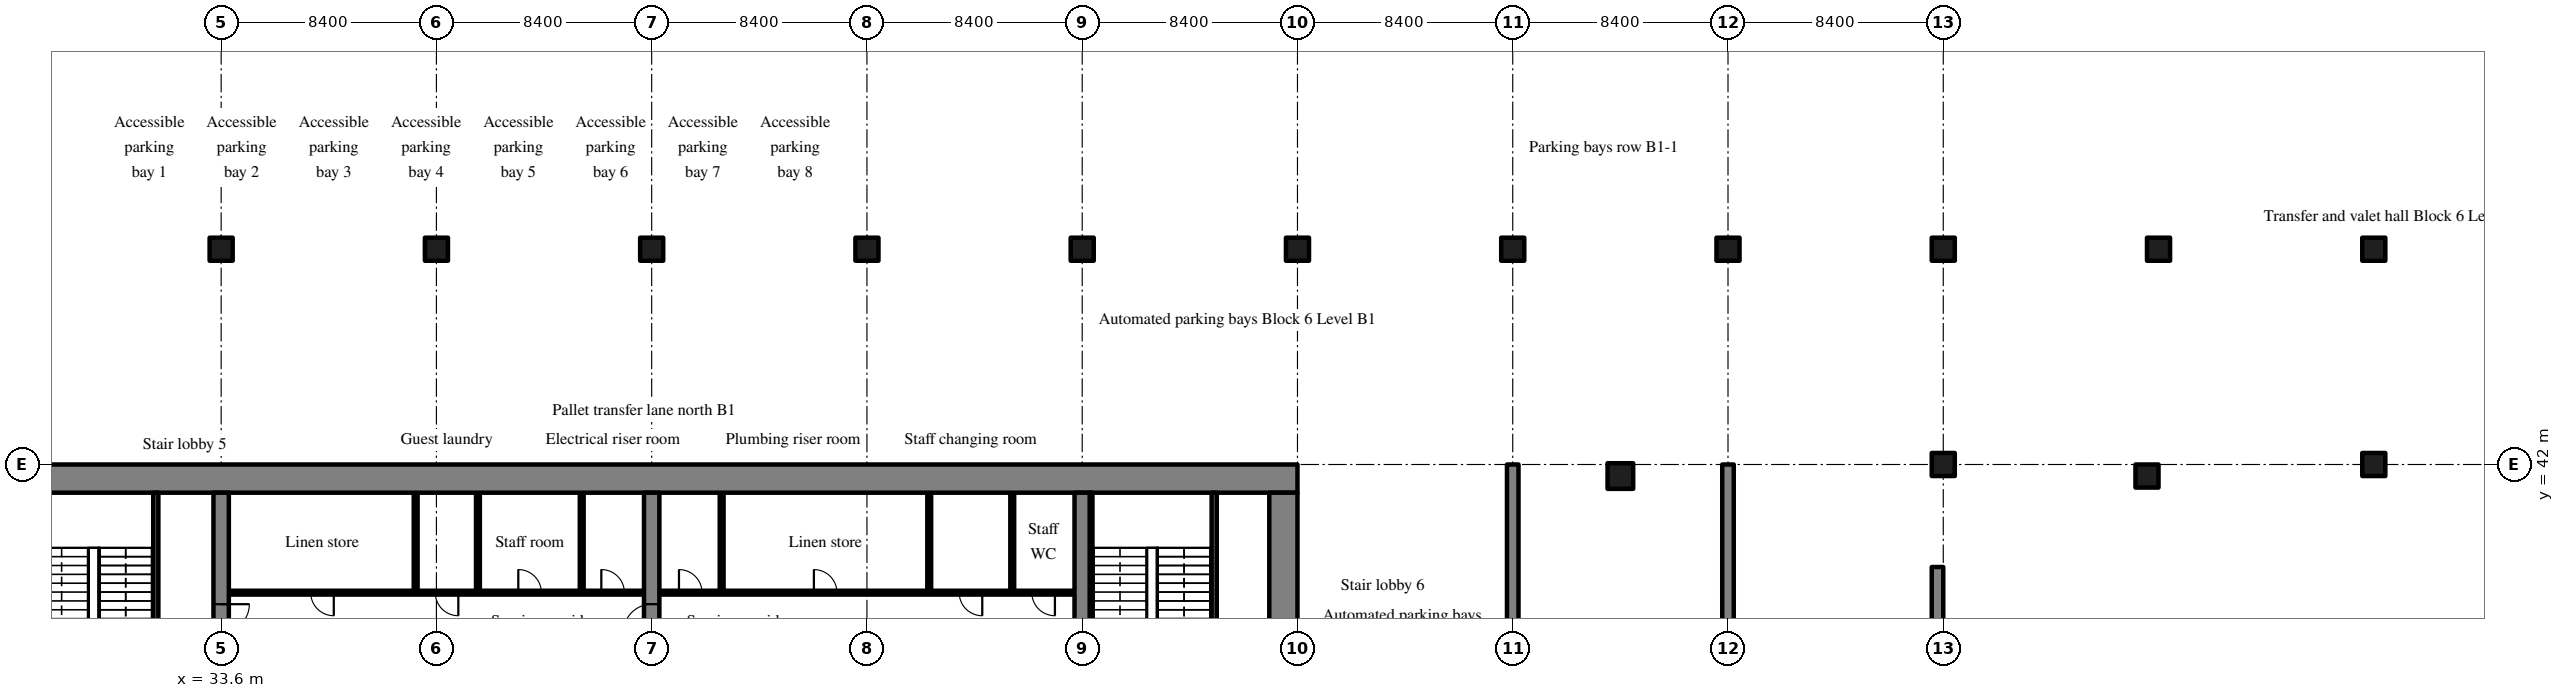
"""IFC4 building model, lengths in metres.
Left out: names, types, materials, properties, quantities, classifications, styles, units other than length and angle.
Written with IfcOpenShell. Run it as: python <this file> out.ifc"""

import sys

from ifc_helpers import new_model, si_unit, direction, frame, frame_2d, origin, origin_2d, place, context, subcontext, project, spatial, rectangle, extrude, source, transform, mapped, element, fill, save


model = new_model("IFC4")
c1 = context("Model", 3, precision=1e-05, world=origin(), true_north=direction((0.0, 1.0)))
c2 = subcontext(c1, "Body", "Model", "MODEL_VIEW")
j1 = project(units=[si_unit("LENGTHUNIT", "METRE"), si_unit("PLANEANGLEUNIT", "RADIAN")], contexts=[c1])
p1 = place(None, origin())
s1 = spatial("IfcSite", under=j1, at=p1, CompositionType="ELEMENT")
p2 = place(p1, origin())
s2 = spatial("IfcBuilding", under=s1, at=p2, CompositionType="ELEMENT")
p3 = place(p2, frame((0.0, 0.0, -4.5)))
s3 = spatial("IfcBuildingStorey", under=s2, at=p3, CompositionType="ELEMENT", Elevation=-4.5)
m1 = source(origin(), c2, "Body", "SweptSolid", [
    extrude(rectangle(XDim=50.4, YDim=1.1, at=frame_2d((25.2, 0.0))), origin(), (0.0, 0.0, 1.0), 4.22),
])
p4 = place(p3, frame((25.2, 41.45, 0.0), z_axis=(0.0, 0.0, 1.0), x_axis=(1.0, 0.0, 0.0)))
e1 = element("IfcWall", 1, at=p4, inside=s3, PredefinedType="SHEAR", context=c2, shape_type="MappedRepresentation", body=[
    mapped(m1, transform((0.0, 0.0, 0.0), scale=1.0)),
])
m2 = source(origin(), c2, "Body", "SweptSolid", [
    extrude(rectangle(XDim=17.8, YDim=1.1, at=frame_2d((8.9, 0.0))), origin(), (0.0, 0.0, 1.0), 4.22),
])
p5 = place(p3, frame((75.05, 23.1, 0.0), z_axis=(0.0, 0.0, 1.0), x_axis=(0.0, 1.0, 0.0)))
e2 = element("IfcWall", 2, at=p5, inside=s3, PredefinedType="SHEAR", context=c2, shape_type="MappedRepresentation", body=[
    mapped(m2, transform((0.0, 0.0, 0.0), scale=1.0)),
])
m3 = source(origin(), c2, "Body", "SweptSolid", [
    extrude(rectangle(XDim=17.8, YDim=0.6, at=frame_2d((8.9, 0.0))), origin(), (0.0, 0.0, 1.0), 4.22),
])
p6 = place(p3, frame((33.6, 23.1, 0.0), z_axis=(0.0, 0.0, 1.0), x_axis=(0.0, 1.0, 0.0)))
e3 = element("IfcWall", 3, at=p6, inside=s3, PredefinedType="SHEAR", context=c2, shape_type="MappedRepresentation", body=[
    mapped(m3, transform((0.0, 0.0, 0.0), scale=1.0)),
])
m4 = source(origin(), c2, "Body", "SweptSolid", [
    extrude(rectangle(XDim=1.1, YDim=2.1, at=frame_2d((0.55, 1.05))), frame((0.0, 0.31, 0.0), z_axis=(0.0, -1.0, 0.0), x_axis=(1.0, 0.0, 0.0)), (0.0, 0.0, 1.0), 0.62),
])
p7 = place(p6, frame((12.35, 0.0, 0.0)))
e4 = element("IfcOpeningElement", 4, at=p7, cuts=e3, PredefinedType="OPENING", context=c2, shape_type="MappedRepresentation", body=[
    mapped(m4, transform((0.0, 0.0, 0.0), scale=1.0)),
])
p8 = place(p3, frame((50.4, 23.1, 0.0), z_axis=(0.0, 0.0, 1.0), x_axis=(0.0, 1.0, 0.0)))
e5 = element("IfcWall", 5, at=p8, inside=s3, PredefinedType="SHEAR", context=c2, shape_type="MappedRepresentation", body=[
    mapped(m3, transform((0.0, 0.0, 0.0), scale=1.0)),
])
p9 = place(p8, frame((12.35, 0.0, 0.0)))
e6 = element("IfcOpeningElement", 6, at=p9, cuts=e5, PredefinedType="OPENING", context=c2, shape_type="MappedRepresentation", body=[
    mapped(m4, transform((0.0, 0.0, 0.0), scale=1.0)),
])
p10 = place(p3, frame((67.2, 23.1, 0.0), z_axis=(0.0, 0.0, 1.0), x_axis=(0.0, 1.0, 0.0)))
e7 = element("IfcWall", 7, at=p10, inside=s3, PredefinedType="SHEAR", context=c2, shape_type="MappedRepresentation", body=[
    mapped(m3, transform((0.0, 0.0, 0.0), scale=1.0)),
])
m5 = source(origin(), c2, "Body", "SweptSolid", [
    extrude(rectangle(XDim=20.0, YDim=0.45, at=frame_2d((10.0, 0.0))), origin(), (0.0, 0.0, 1.0), 4.22),
])
for number, where, z_axis, x_axis in (
    (8, (84.0, 22.0, 0.0), (0.0, 0.0, 1.0), (0.0, 1.0, 0.0)),
    (9, (92.4, 22.0, 0.0), (0.0, 0.0, 1.0), (0.0, 1.0, 0.0)),
):
    element("IfcWall", number, at=place(p3, frame(where, z_axis=z_axis, x_axis=x_axis)), inside=s3, PredefinedType="SHEAR", context=c2, shape_type="MappedRepresentation", body=[
        mapped(m5, transform((0.0, 0.0, 0.0), scale=1.0)),
    ])
m6 = source(origin(), c2, "Body", "SweptSolid", [
    extrude(rectangle(XDim=16.0, YDim=0.45, at=frame_2d((8.0, 0.0))), origin(), (0.0, 0.0, 1.0), 4.22),
])
p11 = place(p3, frame((100.575, 22.0, 0.0), z_axis=(0.0, 0.0, 1.0), x_axis=(0.0, 1.0, 0.0)))
e10 = element("IfcWall", 10, at=p11, inside=s3, PredefinedType="SHEAR", context=c2, shape_type="MappedRepresentation", body=[
    mapped(m6, transform((0.0, 0.0, 0.0), scale=1.0)),
])
m7 = source(origin(), c2, "Body", "SweptSolid", [
    extrude(rectangle(XDim=1.0, YDim=1.0, at=origin_2d()), origin(), (0.0, 0.0, 1.0), 4.22),
])
p12 = place(p3, frame((88.2, 41.55, 0.0), z_axis=(0.0, 0.0, 1.0), x_axis=(1.0, 0.0, 0.0)))
e11 = element("IfcColumn", 11, at=p12, inside=s3, PredefinedType="COLUMN", context=c2, shape_type="MappedRepresentation", body=[
    mapped(m7, transform((0.0, 0.0, 0.0), scale=1.0)),
])
m8 = source(origin(), c2, "Body", "SweptSolid", [
    extrude(rectangle(XDim=0.9, YDim=0.9, at=origin_2d()), origin(), (0.0, 0.0, 1.0), 4.22),
])
for number, where, z_axis, x_axis in (
    (12, (108.75, 41.55, 0.0), (0.0, 0.0, 1.0), (1.0, 0.0, 0.0)),
    (13, (33.6, 50.4, 0.0), (0.0, 0.0, 1.0), (1.0, 0.0, 0.0)),
    (14, (42.0, 50.4, 0.0), (0.0, 0.0, 1.0), (1.0, 0.0, 0.0)),
    (15, (50.4, 50.4, 0.0), (0.0, 0.0, 1.0), (1.0, 0.0, 0.0)),
    (16, (58.8, 50.4, 0.0), (0.0, 0.0, 1.0), (1.0, 0.0, 0.0)),
    (17, (67.2, 50.4, 0.0), (0.0, 0.0, 1.0), (1.0, 0.0, 0.0)),
    (18, (75.6, 50.4, 0.0), (0.0, 0.0, 1.0), (1.0, 0.0, 0.0)),
    (19, (84.0, 50.4, 0.0), (0.0, 0.0, 1.0), (1.0, 0.0, 0.0)),
    (20, (92.4, 50.4, 0.0), (0.0, 0.0, 1.0), (1.0, 0.0, 0.0)),
    (21, (100.8, 42.0, 0.0), (0.0, 0.0, 1.0), (1.0, 0.0, 0.0)),
    (22, (100.8, 50.4, 0.0), (0.0, 0.0, 1.0), (1.0, 0.0, 0.0)),
    (23, (109.2, 50.4, 0.0), (0.0, 0.0, 1.0), (1.0, 0.0, 0.0)),
    (24, (117.6, 42.0, 0.0), (0.0, 0.0, 1.0), (1.0, 0.0, 0.0)),
    (25, (117.6, 50.4, 0.0), (0.0, 0.0, 1.0), (1.0, 0.0, 0.0)),
):
    element("IfcColumn", number, at=place(p3, frame(where, z_axis=z_axis, x_axis=x_axis)), inside=s3, PredefinedType="COLUMN", context=c2, shape_type="MappedRepresentation", body=[
        mapped(m8, transform((0.0, 0.0, 0.0), scale=1.0)),
    ])
m9 = source(origin(), c2, "Body", "SweptSolid", [
    extrude(rectangle(XDim=16.2, YDim=0.15, at=frame_2d((8.1, 0.0))), origin(), (0.0, 0.0, 1.0), 4.22),
])
p13 = place(p3, frame((33.9, 37.0, 0.0), z_axis=(0.0, 0.0, 1.0), x_axis=(1.0, 0.0, 0.0)))
e26 = element("IfcWall", 26, at=p13, inside=s3, PredefinedType="PARTITIONING", context=c2, shape_type="MappedRepresentation", body=[
    mapped(m9, transform((0.0, 0.0, 0.0), scale=1.0)),
])
m10 = source(origin(), c2, "Body", "SweptSolid", [
    extrude(rectangle(XDim=0.9, YDim=2.1, at=frame_2d((0.45, 1.05))), frame((0.0, 0.085, 0.0), z_axis=(0.0, -1.0, 0.0), x_axis=(1.0, 0.0, 0.0)), (0.0, 0.0, 1.0), 0.17),
])
p14 = place(p13, frame((3.195, 0.0, 0.0)))
e27 = element("IfcOpeningElement", 27, at=p14, cuts=e26, PredefinedType="OPENING", context=c2, shape_type="MappedRepresentation", body=[
    mapped(m10, transform((0.0, 0.0, 0.0), scale=1.0)),
])
p15 = place(p13, frame((8.055, 0.0, 0.0)))
e28 = element("IfcOpeningElement", 28, at=p15, cuts=e26, PredefinedType="OPENING", context=c2, shape_type="MappedRepresentation", body=[
    mapped(m10, transform((0.0, 0.0, 0.0), scale=1.0)),
])
p16 = place(p13, frame((11.295, 0.0, 0.0)))
e29 = element("IfcOpeningElement", 29, at=p16, cuts=e26, PredefinedType="OPENING", context=c2, shape_type="MappedRepresentation", body=[
    mapped(m10, transform((0.0, 0.0, 0.0), scale=1.0)),
])
p17 = place(p13, frame((14.535, 0.0, 0.0)))
e30 = element("IfcOpeningElement", 30, at=p17, cuts=e26, PredefinedType="OPENING", context=c2, shape_type="MappedRepresentation", body=[
    mapped(m10, transform((0.0, 0.0, 0.0), scale=1.0)),
])
m11 = source(origin(), c2, "Body", "SweptSolid", [
    extrude(rectangle(XDim=3.9, YDim=0.15, at=frame_2d((1.95, 0.0))), origin(), (0.0, 0.0, 1.0), 4.22),
])
for number, where, z_axis, x_axis in (
    (31, (41.19, 37.0, 0.0), (0.0, 0.0, 1.0), (0.0, 1.0, 0.0)),
    (32, (43.62, 37.0, 0.0), (0.0, 0.0, 1.0), (0.0, 1.0, 0.0)),
    (33, (47.67, 37.0, 0.0), (0.0, 0.0, 1.0), (0.0, 1.0, 0.0)),
):
    element("IfcWall", number, at=place(p3, frame(where, z_axis=z_axis, x_axis=x_axis)), inside=s3, PredefinedType="PARTITIONING", context=c2, shape_type="MappedRepresentation", body=[
        mapped(m11, transform((0.0, 0.0, 0.0), scale=1.0)),
    ])
m12 = source(origin(), c2, "Body", "SweptSolid", [
    extrude(rectangle(XDim=16.2, YDim=0.15, at=frame_2d((8.1, 0.0))), origin(), (0.0, 0.0, 1.0), 4.22),
])
p18 = place(p3, frame((66.9, 37.0, 0.0), z_axis=(0.0, 0.0, 1.0), x_axis=(-1.0, 0.0, 0.0)))
e34 = element("IfcWall", 34, at=p18, inside=s3, PredefinedType="PARTITIONING", context=c2, shape_type="MappedRepresentation", body=[
    mapped(m12, transform((0.0, 0.0, 0.0), scale=1.0)),
])
p19 = place(p18, frame((0.765, 0.0, 0.0)))
e35 = element("IfcOpeningElement", 35, at=p19, cuts=e34, PredefinedType="OPENING", context=c2, shape_type="MappedRepresentation", body=[
    mapped(m10, transform((0.0, 0.0, 0.0), scale=1.0)),
])
p20 = place(p18, frame((3.6, 0.0, 0.0)))
e36 = element("IfcOpeningElement", 36, at=p20, cuts=e34, PredefinedType="OPENING", context=c2, shape_type="MappedRepresentation", body=[
    mapped(m10, transform((0.0, 0.0, 0.0), scale=1.0)),
])
p21 = place(p18, frame((9.27, 0.0, 0.0)))
e37 = element("IfcOpeningElement", 37, at=p21, cuts=e34, PredefinedType="OPENING", context=c2, shape_type="MappedRepresentation", body=[
    mapped(m10, transform((0.0, 0.0, 0.0), scale=1.0)),
])
p22 = place(p18, frame((14.535, 0.0, 0.0)))
e38 = element("IfcOpeningElement", 38, at=p22, cuts=e34, PredefinedType="OPENING", context=c2, shape_type="MappedRepresentation", body=[
    mapped(m10, transform((0.0, 0.0, 0.0), scale=1.0)),
])
for number, where, z_axis, x_axis in (
    (39, (64.47, 37.0, 0.0), (0.0, 0.0, 1.0), (0.0, 1.0, 0.0)),
    (40, (61.23, 37.0, 0.0), (0.0, 0.0, 1.0), (0.0, 1.0, 0.0)),
    (41, (53.13, 37.0, 0.0), (0.0, 0.0, 1.0), (0.0, 1.0, 0.0)),
):
    element("IfcWall", number, at=place(p3, frame(where, z_axis=z_axis, x_axis=x_axis)), inside=s3, PredefinedType="PARTITIONING", context=c2, shape_type="MappedRepresentation", body=[
        mapped(m11, transform((0.0, 0.0, 0.0), scale=1.0)),
    ])
m13 = source(origin(), c2, "Body", "SweptSolid", [
    extrude(rectangle(XDim=7.3, YDim=0.2, at=frame_2d((3.65, 0.0))), origin(), (0.0, 0.0, 1.0), 4.22),
])
p23 = place(p3, frame((31.05, 33.6, 0.0), z_axis=(0.0, 0.0, 1.0), x_axis=(0.0, 1.0, 0.0)))
e42 = element("IfcWall", 42, at=p23, inside=s3, PredefinedType="SOLIDWALL", context=c2, shape_type="MappedRepresentation", body=[
    mapped(m13, transform((0.0, 0.0, 0.0), scale=1.0)),
])
m14 = source(origin(), c2, "Body", "SweptSolid", [
    extrude(rectangle(XDim=1.2, YDim=2.1, at=frame_2d((0.6, 1.05))), frame((0.0, 0.11, 0.0), z_axis=(0.0, -1.0, 0.0), x_axis=(1.0, 0.0, 0.0)), (0.0, 0.0, 1.0), 0.22),
])
p24 = place(p23, frame((0.1, 0.0, 0.0)))
e43 = element("IfcOpeningElement", 43, at=p24, cuts=e42, PredefinedType="OPENING", context=c2, shape_type="MappedRepresentation", body=[
    mapped(m14, transform((0.0, 0.0, 0.0), scale=1.0)),
])
p25 = place(p3, frame((72.35, 33.6, 0.0), z_axis=(0.0, 0.0, 1.0), x_axis=(0.0, 1.0, 0.0)))
e44 = element("IfcWall", 44, at=p25, inside=s3, PredefinedType="SOLIDWALL", context=c2, shape_type="MappedRepresentation", body=[
    mapped(m13, transform((0.0, 0.0, 0.0), scale=1.0)),
])
p26 = place(p25, frame((0.1, 0.0, 0.0)))
e45 = element("IfcOpeningElement", 45, at=p26, cuts=e44, PredefinedType="OPENING", context=c2, shape_type="MappedRepresentation", body=[
    mapped(m14, transform((0.0, 0.0, 0.0), scale=1.0)),
])
m15 = source(origin(), c2, "Body", "SweptSolid", [
    extrude(rectangle(XDim=8.1, YDim=0.1, at=frame_2d((4.05, 0.0))), origin(), (0.0, 0.0, 1.0), 4.22),
])
p27 = place(p3, frame((67.55, 32.8, 0.0), z_axis=(0.0, 0.0, 1.0), x_axis=(0.0, 1.0, 0.0)))
e46 = element("IfcWall", 46, at=p27, inside=s3, PredefinedType="SOLIDWALL", context=c2, shape_type="MappedRepresentation", body=[
    mapped(m15, transform((0.0, 0.0, 0.0), scale=1.0)),
])
m16 = source(origin(), c2, "Body", "SweptSolid", [
    extrude(rectangle(XDim=0.9, YDim=2.1, at=frame_2d((0.45, 1.05))), frame((0.0, 0.025, 0.0), z_axis=(0.0, -1.0, 0.0), x_axis=(1.0, 0.0, 0.0)), (0.0, 0.0, 1.0), 0.05),
])
p28 = place(p14, origin())
e47 = element("IfcDoor", 47, at=p28, inside=s3, OperationType="SINGLE_SWING_RIGHT", PredefinedType="DOOR", context=c2, shape_type="MappedRepresentation", body=[
    mapped(m16, transform((0.0, 0.0, 0.0), scale=1.0)),
])
fill(e27, e47)
p29 = place(p15, origin())
e48 = element("IfcDoor", 48, at=p29, inside=s3, OperationType="SINGLE_SWING_RIGHT", PredefinedType="DOOR", context=c2, shape_type="MappedRepresentation", body=[
    mapped(m16, transform((0.0, 0.0, 0.0), scale=1.0)),
])
fill(e28, e48)
p30 = place(p16, origin())
e49 = element("IfcDoor", 49, at=p30, inside=s3, OperationType="SINGLE_SWING_LEFT", PredefinedType="DOOR", context=c2, shape_type="MappedRepresentation", body=[
    mapped(m16, transform((0.0, 0.0, 0.0), scale=1.0)),
])
fill(e29, e49)
p31 = place(p17, origin())
e50 = element("IfcDoor", 50, at=p31, inside=s3, OperationType="SINGLE_SWING_LEFT", PredefinedType="DOOR", context=c2, shape_type="MappedRepresentation", body=[
    mapped(m16, transform((0.0, 0.0, 0.0), scale=1.0)),
])
fill(e30, e50)
p32 = place(p19, origin())
e51 = element("IfcDoor", 51, at=p32, inside=s3, OperationType="SINGLE_SWING_LEFT", PredefinedType="DOOR", context=c2, shape_type="MappedRepresentation", body=[
    mapped(m16, transform((0.0, 0.0, 0.0), scale=1.0)),
])
fill(e35, e51)
p33 = place(p20, origin())
e52 = element("IfcDoor", 52, at=p33, inside=s3, OperationType="SINGLE_SWING_LEFT", PredefinedType="DOOR", context=c2, shape_type="MappedRepresentation", body=[
    mapped(m16, transform((0.0, 0.0, 0.0), scale=1.0)),
])
fill(e36, e52)
p34 = place(p21, origin())
e53 = element("IfcDoor", 53, at=p34, inside=s3, OperationType="SINGLE_SWING_RIGHT", PredefinedType="DOOR", context=c2, shape_type="MappedRepresentation", body=[
    mapped(m16, transform((0.0, 0.0, 0.0), scale=1.0)),
])
fill(e37, e53)
p35 = place(p22, origin())
e54 = element("IfcDoor", 54, at=p35, inside=s3, OperationType="SINGLE_SWING_RIGHT", PredefinedType="DOOR", context=c2, shape_type="MappedRepresentation", body=[
    mapped(m16, transform((0.0, 0.0, 0.0), scale=1.0)),
])
fill(e38, e54)
m17 = source(origin(), c2, "Body", "SweptSolid", [
    extrude(rectangle(XDim=1.1, YDim=2.1, at=frame_2d((0.55, 1.05))), frame((0.0, 0.025, 0.0), z_axis=(0.0, -1.0, 0.0), x_axis=(1.0, 0.0, 0.0)), (0.0, 0.0, 1.0), 0.05),
])
p36 = place(p7, origin())
e55 = element("IfcDoor", 55, at=p36, inside=s3, OperationType="SINGLE_SWING_RIGHT", PredefinedType="DOOR", context=c2, shape_type="MappedRepresentation", body=[
    mapped(m17, transform((0.0, 0.0, 0.0), scale=1.0)),
])
fill(e4, e55)
p37 = place(p9, origin())
e56 = element("IfcDoor", 56, at=p37, inside=s3, OperationType="SINGLE_SWING_LEFT", PredefinedType="DOOR", context=c2, shape_type="MappedRepresentation", body=[
    mapped(m17, transform((0.0, 0.0, 0.0), scale=1.0)),
])
fill(e6, e56)
save(model, sys.argv[1])
